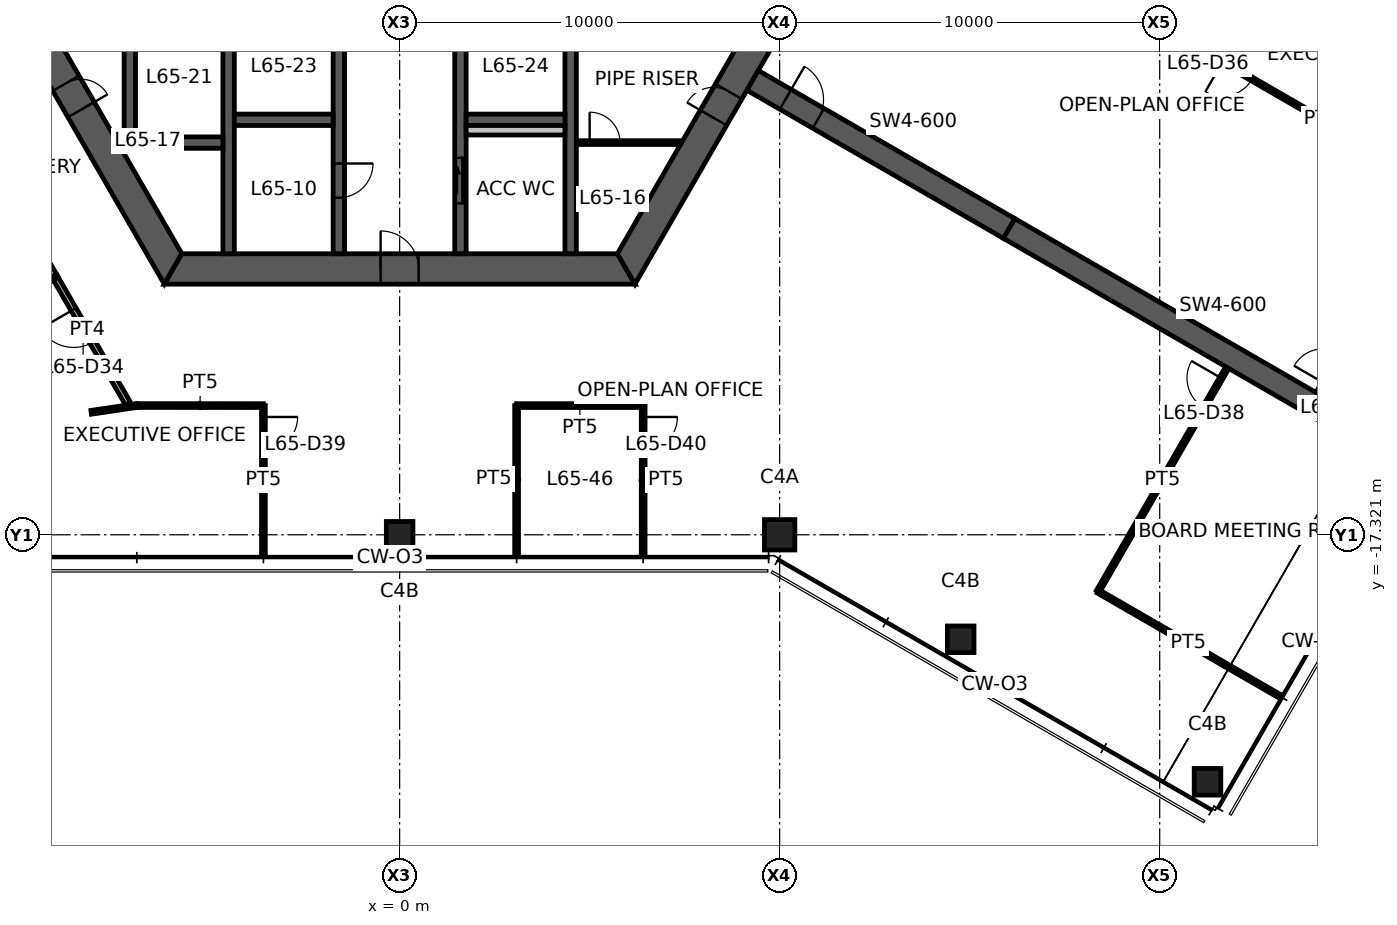
"""IFC4 building model, lengths in metres.
Left out: names, types, materials, properties, quantities, classifications, styles, units other than length and angle.
Written with IfcOpenShell. Run it as: python <this file> out.ifc"""

import sys

from ifc_helpers import new_model, si_unit, direction, frame, frame_2d, origin, origin_2d, place, context, subcontext, project, spatial, polyline, rectangle, hollow_rectangle, outline, extrude, element, fill, save


model = new_model("IFC4")
c1 = context("Model", 3, precision=1e-05, world=origin(), true_north=direction((0.0, 1.0)))
c2 = subcontext(c1, "Body", "Model", "MODEL_VIEW")
j1 = project(units=[si_unit("LENGTHUNIT", "METRE"), si_unit("PLANEANGLEUNIT", "RADIAN")], contexts=[c1])
p1 = place(None, origin())
s1 = spatial("IfcSite", under=j1, at=p1, CompositionType="ELEMENT")
p2 = place(p1, origin())
s2 = spatial("IfcBuilding", under=s1, at=p2, CompositionType="ELEMENT")
p3 = place(p2, frame((0.0, 0.0, 259.6)))
s3 = spatial("IfcBuildingStorey", under=s2, at=p3, CompositionType="ELEMENT", Elevation=259.6)
p4 = place(p3, frame((10.0, -17.321, 0.0), z_axis=(0.0, 0.0, 1.0), x_axis=(1.0, 0.0, 0.0)))
e1 = element("IfcColumn", 1, at=p4, inside=s3, PredefinedType="COLUMN", context=c2, shape_type="SweptSolid", body=[
    extrude(hollow_rectangle(XDim=0.8, YDim=0.8, WallThickness=0.04, at=origin_2d()), origin(), (0.0, 0.0, 1.0), 3.9),
])
for number, where, z_axis, x_axis in (
    (2, (0.0, -17.321, 0.0), (0.0, 0.0, 1.0), (1.0, 0.0, 0.0)),
    (3, (14.763, -20.071, 0.0), (0.0, 0.0, 1.0), (1.0, 0.0, 0.0)),
    (4, (21.258, -23.821, 0.0), (0.0, 0.0, 1.0), (1.0, 0.0, 0.0)),
):
    element("IfcColumn", number, at=place(p3, frame(where, z_axis=z_axis, x_axis=x_axis)), inside=s3, PredefinedType="COLUMN", context=c2, shape_type="SweptSolid", body=[
        extrude(hollow_rectangle(XDim=0.7, YDim=0.7, WallThickness=0.032, at=origin_2d()), origin(), (0.0, 0.0, 1.0), 3.9),
    ])
p5 = place(p3, frame((-11.922, 0.0, 0.0), z_axis=(0.0, 0.0, 1.0), x_axis=(0.500004296715, -0.866022923061, 0.0)))
e5 = element("IfcWall", 5, at=p5, inside=s3, PredefinedType="SHEAR", context=c2, shape_type="SweptSolid", body=[
    extrude(outline(polyline([(-0.231, -0.4), (6.281, -0.4), (7.081, -0.4), (12.153, -0.4), (11.691, 0.4), (7.081, 0.4), (6.281, 0.4), (0.231, 0.4), (-0.231, -0.4)])), origin(), (0.0, 0.0, 1.0), 3.9),
])
p6 = place(p5, frame((6.281, 0.0, 0.0)))
e6 = element("IfcOpeningElement", 6, at=p6, cuts=e5, PredefinedType="OPENING", context=c2, shape_type="SweptSolid", body=[
    extrude(rectangle(XDim=0.8, YDim=2.1, at=frame_2d((0.4, 1.05))), frame((0.0, 0.41, 0.0), z_axis=(0.0, -1.0, 0.0), x_axis=(1.0, 0.0, 0.0)), (0.0, 0.0, 1.0), 0.82),
])
p7 = place(p3, frame((-5.961, -10.325, 0.0), z_axis=(0.0, 0.0, 1.0), x_axis=(1.0, 0.0, 0.0)))
e7 = element("IfcWall", 7, at=p7, inside=s3, PredefinedType="SHEAR", context=c2, shape_type="SweptSolid", body=[
    extrude(outline(polyline([(-0.231, -0.4), (5.461, -0.4), (6.461, -0.4), (12.153, -0.4), (11.691, 0.4), (6.461, 0.4), (5.461, 0.4), (0.231, 0.4), (-0.231, -0.4)])), origin(), (0.0, 0.0, 1.0), 3.9),
])
p8 = place(p7, frame((5.461, 0.0, 0.0)))
e8 = element("IfcOpeningElement", 8, at=p8, cuts=e7, PredefinedType="OPENING", context=c2, shape_type="SweptSolid", body=[
    extrude(rectangle(XDim=1.0, YDim=2.1, at=frame_2d((0.5, 1.05))), frame((0.0, 0.41, 0.0), z_axis=(0.0, -1.0, 0.0), x_axis=(1.0, 0.0, 0.0)), (0.0, 0.0, 1.0), 0.82),
])
p9 = place(p3, frame((5.961, -10.325, 0.0), z_axis=(0.0, 0.0, 1.0), x_axis=(0.500004296715, 0.866022923061, 0.0)))
e9 = element("IfcWall", 9, at=p9, inside=s3, PredefinedType="SHEAR", context=c2, shape_type="SweptSolid", body=[
    extrude(outline(polyline([(-0.231, -0.4), (4.594, -0.4), (5.394, -0.4), (12.153, -0.4), (11.691, 0.4), (5.394, 0.4), (4.594, 0.4), (0.231, 0.4), (-0.231, -0.4)])), origin(), (0.0, 0.0, 1.0), 3.9),
])
p10 = place(p9, frame((4.594, 0.0, 0.0)))
e10 = element("IfcOpeningElement", 10, at=p10, cuts=e9, PredefinedType="OPENING", context=c2, shape_type="SweptSolid", body=[
    extrude(rectangle(XDim=0.8, YDim=2.1, at=frame_2d((0.4, 1.05))), frame((0.0, 0.41, 0.0), z_axis=(0.0, -1.0, 0.0), x_axis=(1.0, 0.0, 0.0)), (0.0, 0.0, 1.0), 0.82),
])
p11 = place(p3, frame((-9.288, -5.363, 0.0), z_axis=(0.0, 0.0, 1.0), x_axis=(-0.866027473358, -0.499996415376, 0.0)))
e11 = element("IfcWall", 11, at=p11, inside=s3, PredefinedType="SHEAR", context=c2, shape_type="SweptSolid", body=[
    extrude(rectangle(XDim=7.045, YDim=0.6, at=frame_2d((3.523, 0.0))), origin(), (0.0, 0.0, 1.0), 3.9),
])
p12 = place(p11, frame((1.0, 0.0, 0.0)))
e12 = element("IfcOpeningElement", 12, at=p12, cuts=e11, PredefinedType="OPENING", context=c2, shape_type="SweptSolid", body=[
    extrude(rectangle(XDim=1.0, YDim=2.1, at=frame_2d((0.5, 1.05))), frame((0.0, 0.31, 0.0), z_axis=(0.0, -1.0, 0.0), x_axis=(1.0, 0.0, 0.0)), (0.0, 0.0, 1.0), 0.62),
])
p13 = place(p3, frame((9.288, -5.363, 0.0), z_axis=(0.0, 0.0, 1.0), x_axis=(0.866031736626, -0.499989031036, 0.0)))
e13 = element("IfcWall", 13, at=p13, inside=s3, PredefinedType="SHEAR", context=c2, shape_type="SweptSolid", body=[
    extrude(rectangle(XDim=7.796, YDim=0.6, at=frame_2d((3.898, 0.0))), origin(), (0.0, 0.0, 1.0), 3.9),
])
p14 = place(p13, frame((1.0, 0.0, 0.0)))
e14 = element("IfcOpeningElement", 14, at=p14, cuts=e13, PredefinedType="OPENING", context=c2, shape_type="SweptSolid", body=[
    extrude(rectangle(XDim=1.0, YDim=2.1, at=frame_2d((0.5, 1.05))), frame((0.0, 0.31, 0.0), z_axis=(0.0, -1.0, 0.0), x_axis=(1.0, 0.0, 0.0)), (0.0, 0.0, 1.0), 0.62),
])
p15 = place(p3, frame((16.039, -9.26, 0.0), z_axis=(0.0, 0.0, 1.0), x_axis=(0.866024837091, -0.50000098154, 0.0)))
e15 = element("IfcWall", 15, at=p15, inside=s3, PredefinedType="SHEAR", context=c2, shape_type="SweptSolid", body=[
    extrude(rectangle(XDim=13.0, YDim=0.6, at=frame_2d((6.5, 0.0))), origin(), (0.0, 0.0, 1.0), 3.9),
])
p16 = place(p3, frame((-1.6, -3.75, 0.0), z_axis=(0.0, 0.0, 1.0), x_axis=(0.0, -1.0, 0.0)))
e16 = element("IfcWall", 16, at=p16, inside=s3, PredefinedType="SHEAR", context=c2, shape_type="SweptSolid", body=[
    extrude(rectangle(XDim=6.175, YDim=0.3, at=frame_2d((3.087, 0.0))), origin(), (0.0, 0.0, 1.0), 3.9),
])
p17 = place(p16, frame((3.8, 0.0, 0.0)))
e17 = element("IfcOpeningElement", 17, at=p17, cuts=e16, PredefinedType="OPENING", context=c2, shape_type="SweptSolid", body=[
    extrude(rectangle(XDim=0.9, YDim=2.1, at=frame_2d((0.45, 1.05))), frame((0.0, 0.16, 0.0), z_axis=(0.0, -1.0, 0.0), x_axis=(1.0, 0.0, 0.0)), (0.0, 0.0, 1.0), 0.32),
])
p18 = place(p3, frame((1.6, -3.75, 0.0), z_axis=(0.0, 0.0, 1.0), x_axis=(0.0, -1.0, 0.0)))
e18 = element("IfcWall", 18, at=p18, inside=s3, PredefinedType="SHEAR", context=c2, shape_type="SweptSolid", body=[
    extrude(rectangle(XDim=6.175, YDim=0.3, at=frame_2d((3.087, 0.0))), origin(), (0.0, 0.0, 1.0), 3.9),
])
p19 = place(p18, frame((3.65, 0.0, 0.0)))
e19 = element("IfcOpeningElement", 19, at=p19, cuts=e18, PredefinedType="OPENING", context=c2, shape_type="SweptSolid", body=[
    extrude(rectangle(XDim=1.2, YDim=2.1, at=frame_2d((0.6, 1.05))), frame((0.0, 0.16, 0.0), z_axis=(0.0, -1.0, 0.0), x_axis=(1.0, 0.0, 0.0)), (0.0, 0.0, 1.0), 0.32),
])
for number, where, z_axis, x_axis in (
    (20, (-4.5, -3.75, 0.0), (0.0, 0.0, 1.0), (0.0, -1.0, 0.0)),
    (21, (4.5, -3.75, 0.0), (0.0, 0.0, 1.0), (0.0, -1.0, 0.0)),
):
    element("IfcWall", number, at=place(p3, frame(where, z_axis=z_axis, x_axis=x_axis)), inside=s3, PredefinedType="SHEAR", context=c2, shape_type="SweptSolid", body=[
        extrude(rectangle(XDim=6.175, YDim=0.3, at=frame_2d((3.087, 0.0))), origin(), (0.0, 0.0, 1.0), 3.9),
    ])
for number, where, z_axis, x_axis in (
    (22, (-4.35, -6.4, 0.0), (0.0, 0.0, 1.0), (1.0, 0.0, 0.0)),
    (23, (1.75, -6.4, 0.0), (0.0, 0.0, 1.0), (1.0, 0.0, 0.0)),
    (24, (-7.25, -7.0, 0.0), (0.0, 0.0, 1.0), (1.0, 0.0, 0.0)),
):
    element("IfcWall", number, at=place(p3, frame(where, z_axis=z_axis, x_axis=x_axis)), inside=s3, PredefinedType="SHEAR", context=c2, shape_type="SweptSolid", body=[
        extrude(rectangle(XDim=2.6, YDim=0.3, at=frame_2d((1.3, 0.0))), origin(), (0.0, 0.0, 1.0), 3.9),
    ])
p20 = place(p3, frame((-7.1, -3.75, 0.0), z_axis=(0.0, 0.0, 1.0), x_axis=(0.0, -1.0, 0.0)))
e25 = element("IfcWall", 25, at=p20, inside=s3, PredefinedType="SHEAR", context=c2, shape_type="SweptSolid", body=[
    extrude(rectangle(XDim=3.1, YDim=0.3, at=frame_2d((1.55, 0.0))), origin(), (0.0, 0.0, 1.0), 3.9),
])
p21 = place(p3, frame((1.75, -6.675, 0.0), z_axis=(0.0, 0.0, 1.0), x_axis=(1.0, 0.0, 0.0)))
e26 = element("IfcWall", 26, at=p21, inside=s3, PredefinedType="PLUMBINGWALL", context=c2, shape_type="SweptSolid", body=[
    extrude(rectangle(XDim=2.6, YDim=0.25, at=frame_2d((1.3, 0.0))), origin(), (0.0, 0.0, 1.0), 3.9),
])
p22 = place(p3, frame((4.65, -7.0, 0.0), z_axis=(0.0, 0.0, 1.0), x_axis=(1.0, 0.0, 0.0)))
e27 = element("IfcWall", 27, at=p22, inside=s3, PredefinedType="PARTITIONING", context=c2, shape_type="SweptSolid", body=[
    extrude(outline(polyline([(0.0, -0.05), (0.35, -0.05), (1.15, -0.05), (2.74, -0.05), (2.769, 0.0), (2.775, 0.05), (1.15, 0.05), (0.35, 0.05), (0.0, 0.05), (0.0, -0.05)])), origin(), (0.0, 0.0, 1.0), 2.95),
])
p23 = place(p22, frame((0.35, 0.0, 0.0)))
e28 = element("IfcOpeningElement", 28, at=p23, cuts=e27, PredefinedType="OPENING", context=c2, shape_type="SweptSolid", body=[
    extrude(rectangle(XDim=0.8, YDim=2.1, at=frame_2d((0.4, 1.05))), frame((0.0, 0.06, 0.0), z_axis=(0.0, -1.0, 0.0), x_axis=(1.0, 0.0, 0.0)), (0.0, 0.0, 1.0), 0.12),
])
p24 = place(p3, frame((-9.064, -10.551, 0.0), z_axis=(0.0, 0.0, 1.0), x_axis=(-0.499977562641, 0.866038357612, 0.0)))
e29 = element("IfcWall", 29, at=p24, inside=s3, PredefinedType="PARTITIONING", context=c2, shape_type="SweptSolid", body=[
    extrude(rectangle(XDim=3.01, YDim=0.15, at=frame_2d((1.505, 0.0))), origin(), (0.0, 0.0, 1.0), 2.95),
])
p25 = place(p3, frame((-7.144, -13.876, 0.0), z_axis=(0.0, 0.0, 1.0), x_axis=(-0.499993312796, 0.866029264609, 0.0)))
e30 = element("IfcWall", 30, at=p25, inside=s3, PredefinedType="PARTITIONING", context=c2, shape_type="SweptSolid", body=[
    extrude(rectangle(XDim=3.849, YDim=0.15, at=frame_2d((1.925, 0.0))), origin(), (0.0, 0.0, 1.0), 2.95),
])
p26 = place(p25, frame((1.869, 0.0, 0.0)))
e31 = element("IfcOpeningElement", 31, at=p26, cuts=e30, PredefinedType="OPENING", context=c2, shape_type="SweptSolid", body=[
    extrude(rectangle(XDim=1.0, YDim=2.1, at=frame_2d((0.5, 1.05))), frame((0.0, 0.085, 0.0), z_axis=(0.0, -1.0, 0.0), x_axis=(1.0, 0.0, 0.0)), (0.0, 0.0, 1.0), 0.17),
])
p27 = place(p3, frame((-9.069, -10.542, 0.0), z_axis=(0.0, 0.0, 1.0), x_axis=(-0.865195372903, -0.501434907746, 0.0)))
e32 = element("IfcWall", 32, at=p27, inside=s3, PredefinedType="PARTITIONING", context=c2, shape_type="SweptSolid", body=[
    extrude(rectangle(XDim=2.8, YDim=0.1, at=frame_2d((1.4, 0.0))), origin(), (0.0, 0.0, 1.0), 2.95),
])
p28 = place(p3, frame((21.392, -4.73, 0.0), z_axis=(0.0, 0.0, 1.0), x_axis=(0.500043804875, 0.866000111551, 0.0)))
e33 = element("IfcWall", 33, at=p28, inside=s3, PredefinedType="PARTITIONING", context=c2, shape_type="SweptSolid", body=[
    extrude(rectangle(XDim=3.88, YDim=0.1, at=frame_2d((1.94, 0.0))), origin(), (0.0, 0.0, 1.0), 2.95),
])
p29 = place(p3, frame((27.125, -8.04, 0.0), z_axis=(0.0, 0.0, 1.0), x_axis=(-0.866030817826, 0.499990622488, 0.0)))
e34 = element("IfcWall", 34, at=p29, inside=s3, PredefinedType="PARTITIONING", context=c2, shape_type="SweptSolid", body=[
    extrude(rectangle(XDim=6.62, YDim=0.1, at=frame_2d((3.31, 0.0))), origin(), (0.0, 0.0, 1.0), 2.95),
])
p30 = place(p29, frame((5.42, 0.0, 0.0)))
e35 = element("IfcOpeningElement", 35, at=p30, cuts=e34, PredefinedType="OPENING", context=c2, shape_type="SweptSolid", body=[
    extrude(rectangle(XDim=0.9, YDim=2.1, at=frame_2d((0.45, 1.05))), frame((0.0, 0.06, 0.0), z_axis=(0.0, -1.0, 0.0), x_axis=(1.0, 0.0, 0.0)), (0.0, 0.0, 1.0), 0.12),
])
p31 = place(p3, frame((24.167, -13.583, 0.0), z_axis=(0.0, 0.0, 1.0), x_axis=(0.500007997579, 0.866020786331, 0.0)))
e36 = element("IfcWall", 36, at=p31, inside=s3, PredefinedType="PARTITIONING", context=c2, shape_type="SweptSolid", body=[
    extrude(rectangle(XDim=3.38, YDim=0.1, at=frame_2d((1.69, 0.0))), origin(), (0.0, 0.0, 1.0), 2.95),
])
p32 = place(p31, frame((0.3, 0.0, 0.0)))
e37 = element("IfcOpeningElement", 37, at=p32, cuts=e36, PredefinedType="OPENING", context=c2, shape_type="SweptSolid", body=[
    extrude(rectangle(XDim=0.9, YDim=2.1, at=frame_2d((0.45, 1.05))), frame((0.0, 0.06, 0.0), z_axis=(0.0, -1.0, 0.0), x_axis=(1.0, 0.0, 0.0)), (0.0, 0.0, 1.0), 0.12),
])
p33 = place(p3, frame((18.378, -18.809, 0.0), z_axis=(0.0, 0.0, 1.0), x_axis=(0.500019607421, 0.866014083139, 0.0)))
e38 = element("IfcWall", 38, at=p33, inside=s3, PredefinedType="PARTITIONING", context=c2, shape_type="SweptSolid", body=[
    extrude(rectangle(XDim=6.78, YDim=0.1, at=frame_2d((3.39, 0.0))), origin(), (0.0, 0.0, 1.0), 2.95),
])
p34 = place(p33, frame((5.58, 0.0, 0.0)))
e39 = element("IfcOpeningElement", 39, at=p34, cuts=e38, PredefinedType="OPENING", context=c2, shape_type="SweptSolid", body=[
    extrude(rectangle(XDim=0.9, YDim=2.1, at=frame_2d((0.45, 1.05))), frame((0.0, 0.06, 0.0), z_axis=(0.0, -1.0, 0.0), x_axis=(1.0, 0.0, 0.0)), (0.0, 0.0, 1.0), 0.12),
])
p35 = place(p3, frame((23.124, -21.549, 0.0), z_axis=(0.0, 0.0, 1.0), x_axis=(-0.866027562125, 0.499996261625, 0.0)))
e40 = element("IfcWall", 40, at=p35, inside=s3, PredefinedType="PARTITIONING", context=c2, shape_type="SweptSolid", body=[
    extrude(rectangle(XDim=5.48, YDim=0.1, at=frame_2d((2.74, 0.0))), origin(), (0.0, 0.0, 1.0), 2.95),
])
p36 = place(p3, frame((-8.116, -14.098, 0.0), z_axis=(0.0, 0.0, 1.0), x_axis=(0.989162387444, 0.146825649214, 0.0)))
e41 = element("IfcWall", 41, at=p36, inside=s3, PredefinedType="PARTITIONING", context=c2, shape_type="SweptSolid", body=[
    extrude(rectangle(XDim=1.214, YDim=0.1, at=frame_2d((0.607, 0.0))), origin(), (0.0, 0.0, 1.0), 2.95),
])
p37 = place(p3, frame((-6.916, -13.919, 0.0), z_axis=(0.0, 0.0, 1.0), x_axis=(0.999999957026, -0.000293169146, 0.0)))
e42 = element("IfcWall", 42, at=p37, inside=s3, PredefinedType="PARTITIONING", context=c2, shape_type="SweptSolid", body=[
    extrude(rectangle(XDim=3.331, YDim=0.1, at=frame_2d((1.666, 0.0))), origin(), (0.0, 0.0, 1.0), 2.95),
])
p38 = place(p3, frame((-3.584, -13.92, 0.0), z_axis=(0.0, 0.0, 1.0), x_axis=(0.0, -1.0, 0.0)))
e43 = element("IfcWall", 43, at=p38, inside=s3, PredefinedType="PARTITIONING", context=c2, shape_type="SweptSolid", body=[
    extrude(rectangle(XDim=3.935, YDim=0.1, at=frame_2d((1.968, 0.0))), origin(), (0.0, 0.0, 1.0), 2.95),
])
p39 = place(p38, frame((0.3, 0.0, 0.0)))
e44 = element("IfcOpeningElement", 44, at=p39, cuts=e43, PredefinedType="OPENING", context=c2, shape_type="SweptSolid", body=[
    extrude(rectangle(XDim=0.9, YDim=2.1, at=frame_2d((0.45, 1.05))), frame((0.0, 0.06, 0.0), z_axis=(0.0, -1.0, 0.0), x_axis=(1.0, 0.0, 0.0)), (0.0, 0.0, 1.0), 0.12),
])
p40 = place(p3, frame((3.077, -17.801, 0.0), z_axis=(0.0, 0.0, 1.0), x_axis=(0.0, 1.0, 0.0)))
e45 = element("IfcWall", 45, at=p40, inside=s3, PredefinedType="PARTITIONING", context=c2, shape_type="SweptSolid", body=[
    extrude(rectangle(XDim=3.88, YDim=0.1, at=frame_2d((1.94, 0.0))), origin(), (0.0, 0.0, 1.0), 2.95),
])
p41 = place(p3, frame((3.077, -13.92, 0.0), z_axis=(0.0, 0.0, 1.0), x_axis=(1.0, 0.0, 0.0)))
e46 = element("IfcWall", 46, at=p41, inside=s3, PredefinedType="PARTITIONING", context=c2, shape_type="SweptSolid", body=[
    extrude(rectangle(XDim=3.331, YDim=0.1, at=frame_2d((1.666, 0.0))), origin(), (0.0, 0.0, 1.0), 2.95),
])
p42 = place(p3, frame((6.408, -13.92, 0.0), z_axis=(0.0, 0.0, 1.0), x_axis=(0.0, -1.0, 0.0)))
e47 = element("IfcWall", 47, at=p42, inside=s3, PredefinedType="PARTITIONING", context=c2, shape_type="SweptSolid", body=[
    extrude(rectangle(XDim=3.935, YDim=0.1, at=frame_2d((1.968, 0.0))), origin(), (0.0, 0.0, 1.0), 2.95),
])
p43 = place(p42, frame((0.3, 0.0, 0.0)))
e48 = element("IfcOpeningElement", 48, at=p43, cuts=e47, PredefinedType="OPENING", context=c2, shape_type="SweptSolid", body=[
    extrude(rectangle(XDim=0.9, YDim=2.1, at=frame_2d((0.45, 1.05))), frame((0.0, 0.06, 0.0), z_axis=(0.0, -1.0, 0.0), x_axis=(1.0, 0.0, 0.0)), (0.0, 0.0, 1.0), 0.12),
])
p44 = place(p8, origin())
e49 = element("IfcDoor", 49, at=p44, inside=s3, OperationType="SINGLE_SWING_LEFT", PredefinedType="DOOR", context=c2, shape_type="SweptSolid", body=[
    extrude(rectangle(XDim=1.0, YDim=2.1, at=frame_2d((0.5, 1.05))), frame((0.0, 0.025, 0.0), z_axis=(0.0, -1.0, 0.0), x_axis=(1.0, 0.0, 0.0)), (0.0, 0.0, 1.0), 0.05),
])
fill(e8, e49)
p45 = place(p10, origin())
e50 = element("IfcDoor", 50, at=p45, inside=s3, OperationType="SINGLE_SWING_LEFT", PredefinedType="DOOR", context=c2, shape_type="SweptSolid", body=[
    extrude(rectangle(XDim=0.8, YDim=2.1, at=frame_2d((0.4, 1.05))), frame((0.0, 0.025, 0.0), z_axis=(0.0, -1.0, 0.0), x_axis=(1.0, 0.0, 0.0)), (0.0, 0.0, 1.0), 0.05),
])
fill(e10, e50)
p46 = place(p6, origin())
e51 = element("IfcDoor", 51, at=p46, inside=s3, OperationType="SINGLE_SWING_RIGHT", PredefinedType="DOOR", context=c2, shape_type="SweptSolid", body=[
    extrude(rectangle(XDim=0.8, YDim=2.1, at=frame_2d((0.4, 1.05))), frame((0.0, 0.025, 0.0), z_axis=(0.0, -1.0, 0.0), x_axis=(1.0, 0.0, 0.0)), (0.0, 0.0, 1.0), 0.05),
])
fill(e6, e51)
p47 = place(p19, origin())
e52 = element("IfcDoor", 52, at=p47, inside=s3, OperationType="SLIDING_TO_LEFT", PredefinedType="DOOR", context=c2, shape_type="SweptSolid", body=[
    extrude(rectangle(XDim=1.2, YDim=2.1, at=frame_2d((0.6, 1.05))), frame((0.0, 0.025, 0.0), z_axis=(0.0, -1.0, 0.0), x_axis=(1.0, 0.0, 0.0)), (0.0, 0.0, 1.0), 0.05),
])
fill(e19, e52)
p48 = place(p17, origin())
e53 = element("IfcDoor", 53, at=p48, inside=s3, OperationType="SINGLE_SWING_LEFT", PredefinedType="DOOR", context=c2, shape_type="SweptSolid", body=[
    extrude(rectangle(XDim=0.9, YDim=2.1, at=frame_2d((0.45, 1.05))), frame((0.0, 0.025, 0.0), z_axis=(0.0, -1.0, 0.0), x_axis=(1.0, 0.0, 0.0)), (0.0, 0.0, 1.0), 0.05),
])
fill(e17, e53)
p49 = place(p14, origin())
e54 = element("IfcDoor", 54, at=p49, inside=s3, OperationType="SINGLE_SWING_LEFT", PredefinedType="DOOR", context=c2, shape_type="SweptSolid", body=[
    extrude(rectangle(XDim=1.0, YDim=2.1, at=frame_2d((0.5, 1.05))), frame((0.0, 0.025, 0.0), z_axis=(0.0, -1.0, 0.0), x_axis=(1.0, 0.0, 0.0)), (0.0, 0.0, 1.0), 0.05),
])
fill(e14, e54)
p50 = place(p23, origin())
e55 = element("IfcDoor", 55, at=p50, inside=s3, OperationType="SINGLE_SWING_LEFT", PredefinedType="DOOR", context=c2, shape_type="SweptSolid", body=[
    extrude(rectangle(XDim=0.8, YDim=2.1, at=frame_2d((0.4, 1.05))), frame((0.0, 0.025, 0.0), z_axis=(0.0, -1.0, 0.0), x_axis=(1.0, 0.0, 0.0)), (0.0, 0.0, 1.0), 0.05),
])
fill(e28, e55)
p51 = place(p26, origin())
e56 = element("IfcDoor", 56, at=p51, inside=s3, OperationType="SINGLE_SWING_RIGHT", PredefinedType="DOOR", context=c2, shape_type="SweptSolid", body=[
    extrude(rectangle(XDim=1.0, YDim=2.1, at=frame_2d((0.5, 1.05))), frame((0.0, 0.025, 0.0), z_axis=(0.0, -1.0, 0.0), x_axis=(1.0, 0.0, 0.0)), (0.0, 0.0, 1.0), 0.05),
])
fill(e31, e56)
p52 = place(p30, origin())
e57 = element("IfcDoor", 57, at=p52, inside=s3, OperationType="SINGLE_SWING_RIGHT", PredefinedType="DOOR", context=c2, shape_type="SweptSolid", body=[
    extrude(rectangle(XDim=0.9, YDim=2.1, at=frame_2d((0.45, 1.05))), frame((0.0, 0.025, 0.0), z_axis=(0.0, -1.0, 0.0), x_axis=(1.0, 0.0, 0.0)), (0.0, 0.0, 1.0), 0.05),
])
fill(e35, e57)
p53 = place(p34, origin())
e58 = element("IfcDoor", 58, at=p53, inside=s3, OperationType="SINGLE_SWING_RIGHT", PredefinedType="DOOR", context=c2, shape_type="SweptSolid", body=[
    extrude(rectangle(XDim=0.9, YDim=2.1, at=frame_2d((0.45, 1.05))), frame((0.0, 0.025, 0.0), z_axis=(0.0, -1.0, 0.0), x_axis=(1.0, 0.0, 0.0)), (0.0, 0.0, 1.0), 0.05),
])
fill(e39, e58)
p54 = place(p39, origin())
e59 = element("IfcDoor", 59, at=p54, inside=s3, OperationType="SINGLE_SWING_LEFT", PredefinedType="DOOR", context=c2, shape_type="SweptSolid", body=[
    extrude(rectangle(XDim=0.9, YDim=2.1, at=frame_2d((0.45, 1.05))), frame((0.0, 0.025, 0.0), z_axis=(0.0, -1.0, 0.0), x_axis=(1.0, 0.0, 0.0)), (0.0, 0.0, 1.0), 0.05),
])
fill(e44, e59)
p55 = place(p43, origin())
e60 = element("IfcDoor", 60, at=p55, inside=s3, OperationType="SINGLE_SWING_LEFT", PredefinedType="DOOR", context=c2, shape_type="SweptSolid", body=[
    extrude(rectangle(XDim=0.9, YDim=2.1, at=frame_2d((0.45, 1.05))), frame((0.0, 0.025, 0.0), z_axis=(0.0, -1.0, 0.0), x_axis=(1.0, 0.0, 0.0)), (0.0, 0.0, 1.0), 0.05),
])
fill(e48, e60)
save(model, sys.argv[1])
